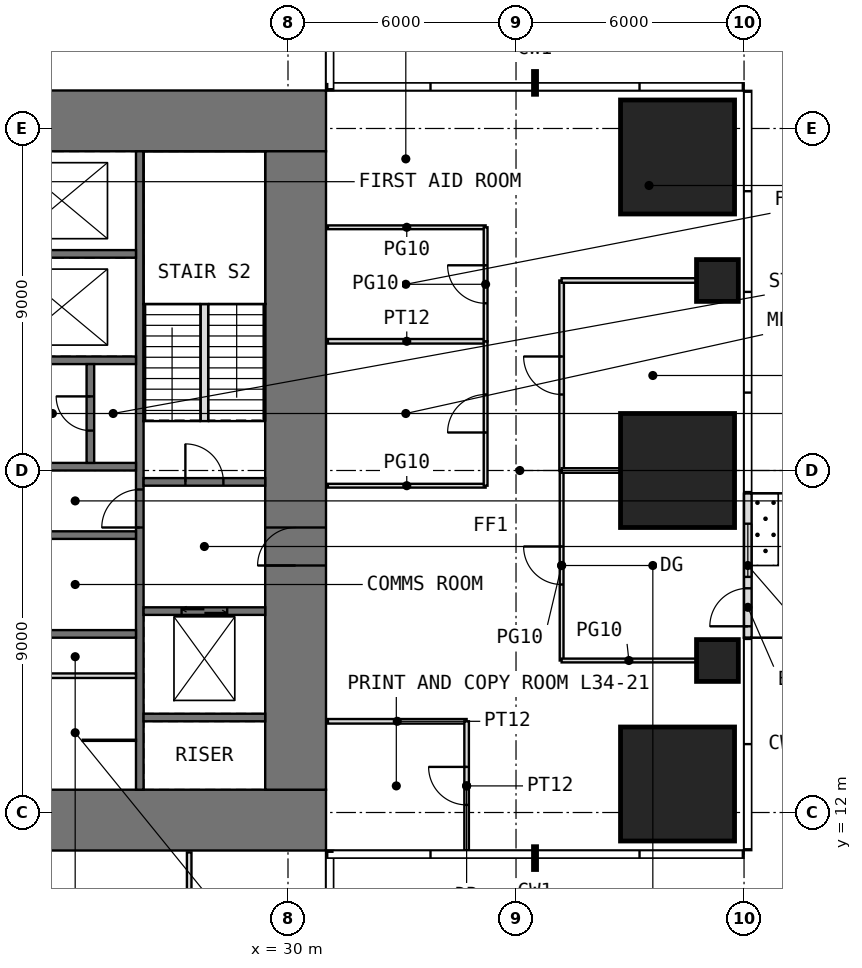
"""IFC4 building model, lengths in metres.
Left out: names, types, materials, properties, quantities, classifications, styles, units other than length and angle.
Written with IfcOpenShell. Run it as: python <this file> out.ifc"""

import sys

from ifc_helpers import new_model, si_unit, direction, frame, frame_2d, origin, origin_2d, place, context, subcontext, project, spatial, rectangle, extrude, element, fill, save


model = new_model("IFC4")
c1 = context("Model", 3, precision=1e-05, world=origin(), true_north=direction((0.0, 1.0)))
c2 = subcontext(c1, "Body", "Model", "MODEL_VIEW")
j1 = project(units=[si_unit("LENGTHUNIT", "METRE"), si_unit("PLANEANGLEUNIT", "RADIAN")], contexts=[c1])
p1 = place(None, origin())
s1 = spatial("IfcSite", under=j1, at=p1, CompositionType="ELEMENT")
p2 = place(p1, origin())
s2 = spatial("IfcBuilding", under=s1, at=p2, CompositionType="ELEMENT")
p3 = place(p2, frame((0.0, 0.0, 144.5)))
s3 = spatial("IfcBuildingStorey", under=s2, at=p3, CompositionType="ELEMENT", Elevation=144.5)
p4 = place(p3, frame((40.25, 12.75, 0.0), z_axis=(0.0, 0.0, 1.0), x_axis=(1.0, 0.0, 0.0)))
e1 = element("IfcColumn", 1, at=p4, inside=s3, PredefinedType="COLUMN", context=c2, shape_type="SweptSolid", body=[
    extrude(rectangle(XDim=3.0, YDim=3.0, at=origin_2d()), origin(), (0.0, 0.0, 1.0), 4.0),
])
p5 = place(p3, frame((41.3, 16.0, 0.0), z_axis=(0.0, 0.0, 1.0), x_axis=(1.0, 0.0, 0.0)))
e2 = element("IfcColumn", 2, at=p5, inside=s3, PredefinedType="COLUMN", context=c2, shape_type="SweptSolid", body=[
    extrude(rectangle(XDim=1.1, YDim=1.1, at=origin_2d()), origin(), (0.0, 0.0, 1.0), 4.0),
])
p6 = place(p3, frame((40.25, 21.0, 0.0), z_axis=(0.0, 0.0, 1.0), x_axis=(1.0, 0.0, 0.0)))
e3 = element("IfcColumn", 3, at=p6, inside=s3, PredefinedType="COLUMN", context=c2, shape_type="SweptSolid", body=[
    extrude(rectangle(XDim=3.0, YDim=3.0, at=origin_2d()), origin(), (0.0, 0.0, 1.0), 4.0),
])
p7 = place(p3, frame((41.3, 26.0, 0.0), z_axis=(0.0, 0.0, 1.0), x_axis=(1.0, 0.0, 0.0)))
e4 = element("IfcColumn", 4, at=p7, inside=s3, PredefinedType="COLUMN", context=c2, shape_type="SweptSolid", body=[
    extrude(rectangle(XDim=1.1, YDim=1.1, at=origin_2d()), origin(), (0.0, 0.0, 1.0), 4.0),
])
p8 = place(p3, frame((40.25, 29.25, 0.0), z_axis=(0.0, 0.0, 1.0), x_axis=(1.0, 0.0, 0.0)))
e5 = element("IfcColumn", 5, at=p8, inside=s3, PredefinedType="COLUMN", context=c2, shape_type="SweptSolid", body=[
    extrude(rectangle(XDim=3.0, YDim=3.0, at=origin_2d()), origin(), (0.0, 0.0, 1.0), 4.0),
])
p9 = place(p3, frame((42.1, 16.6, 0.0), z_axis=(0.0, 0.0, 1.0), x_axis=(0.0, 1.0, 0.0)))
e6 = element("IfcWall", 6, at=p9, inside=s3, PredefinedType="USERDEFINED", context=c2, shape_type="SweptSolid", body=[
    extrude(rectangle(XDim=3.8, YDim=0.2, at=frame_2d((1.9, 0.0))), origin(), (0.0, 0.0, 1.0), 3.75),
])
p10 = place(p9, frame((0.3, 0.0, 0.0)))
e7 = element("IfcOpeningElement", 7, at=p10, cuts=e6, PredefinedType="OPENING", context=c2, shape_type="SweptSolid", body=[
    extrude(rectangle(XDim=1.0, YDim=2.4, at=frame_2d((0.5, 1.2))), frame((0.0, 0.11, 0.0), z_axis=(0.0, -1.0, 0.0), x_axis=(1.0, 0.0, 0.0)), (0.0, 0.0, 1.0), 0.22),
])
p11 = place(p9, frame((1.6, 0.0, 0.3)))
e8 = element("IfcOpeningElement", 8, at=p11, cuts=e6, PredefinedType="OPENING", context=c2, shape_type="SweptSolid", body=[
    extrude(rectangle(XDim=1.4, YDim=2.7, at=frame_2d((0.7, 1.35))), frame((0.0, 0.11, 0.0), z_axis=(0.0, -1.0, 0.0), x_axis=(1.0, 0.0, 0.0)), (0.0, 0.0, 1.0), 0.22),
])
p12 = place(p3, frame((11.0, 11.8, -0.05), z_axis=(0.0, 0.0, 1.0), x_axis=(1.0, 0.0, 0.0)))
e9 = element("IfcWall", 9, at=p12, inside=s3, PredefinedType="SHEAR", context=c2, shape_type="SweptSolid", body=[
    extrude(rectangle(XDim=20.0, YDim=1.6, at=frame_2d((10.0, 0.0))), origin(), (0.0, 0.0, 1.0), 4.0),
])
p13 = place(p12, frame((9.0, 0.0, 0.05)))
e10 = element("IfcOpeningElement", 10, at=p13, cuts=e9, PredefinedType="OPENING", context=c2, shape_type="SweptSolid", body=[
    extrude(rectangle(XDim=2.0, YDim=2.2, at=frame_2d((1.0, 1.1))), frame((0.0, 0.81, 0.0), z_axis=(0.0, -1.0, 0.0), x_axis=(1.0, 0.0, 0.0)), (0.0, 0.0, 1.0), 1.62),
])
p14 = place(p3, frame((11.0, 30.2, -0.05), z_axis=(0.0, 0.0, 1.0), x_axis=(1.0, 0.0, 0.0)))
e11 = element("IfcWall", 11, at=p14, inside=s3, PredefinedType="SHEAR", context=c2, shape_type="SweptSolid", body=[
    extrude(rectangle(XDim=20.0, YDim=1.6, at=frame_2d((10.0, 0.0))), origin(), (0.0, 0.0, 1.0), 4.0),
])
p15 = place(p14, frame((9.0, 0.0, 0.05)))
e12 = element("IfcOpeningElement", 12, at=p15, cuts=e11, PredefinedType="OPENING", context=c2, shape_type="SweptSolid", body=[
    extrude(rectangle(XDim=2.0, YDim=2.2, at=frame_2d((1.0, 1.1))), frame((0.0, 0.81, 0.0), z_axis=(0.0, -1.0, 0.0), x_axis=(1.0, 0.0, 0.0)), (0.0, 0.0, 1.0), 1.62),
])
p16 = place(p3, frame((30.2, 12.6, -0.05), z_axis=(0.0, 0.0, 1.0), x_axis=(0.0, 1.0, 0.0)))
e13 = element("IfcWall", 13, at=p16, inside=s3, PredefinedType="SHEAR", context=c2, shape_type="SweptSolid", body=[
    extrude(rectangle(XDim=16.8, YDim=1.6, at=frame_2d((8.4, 0.0))), origin(), (0.0, 0.0, 1.0), 4.0),
])
p17 = place(p16, frame((5.9, 0.0, 0.05)))
e14 = element("IfcOpeningElement", 14, at=p17, cuts=e13, PredefinedType="OPENING", context=c2, shape_type="SweptSolid", body=[
    extrude(rectangle(XDim=1.0, YDim=2.2, at=frame_2d((0.5, 1.1))), frame((0.0, 0.81, 0.0), z_axis=(0.0, -1.0, 0.0), x_axis=(1.0, 0.0, 0.0)), (0.0, 0.0, 1.0), 1.62),
])
p18 = place(p3, frame((26.1, 12.6, -0.05), z_axis=(0.0, 0.0, 1.0), x_axis=(0.0, 1.0, 0.0)))
e15 = element("IfcWall", 15, at=p18, inside=s3, PredefinedType="SHEAR", context=c2, shape_type="SweptSolid", body=[
    extrude(rectangle(XDim=16.8, YDim=0.2, at=frame_2d((8.4, 0.0))), origin(), (0.0, 0.0, 1.0), 4.0),
])
p19 = place(p18, frame((6.9, 0.0, 0.05)))
e16 = element("IfcOpeningElement", 16, at=p19, cuts=e15, PredefinedType="OPENING", context=c2, shape_type="SweptSolid", body=[
    extrude(rectangle(XDim=1.0, YDim=2.2, at=frame_2d((0.5, 1.1))), frame((0.0, 0.11, 0.0), z_axis=(0.0, -1.0, 0.0), x_axis=(1.0, 0.0, 0.0)), (0.0, 0.0, 1.0), 0.22),
])
for number, where, z_axis, x_axis in (
    (17, (22.8, 16.7, -0.05), (0.0, 0.0, 1.0), (1.0, 0.0, 0.0)),
    (18, (22.8, 19.3, -0.05), (0.0, 0.0, 1.0), (1.0, 0.0, 0.0)),
    (19, (22.8, 21.1, -0.05), (0.0, 0.0, 1.0), (1.0, 0.0, 0.0)),
    (20, (22.8, 23.9, -0.05), (0.0, 0.0, 1.0), (1.0, 0.0, 0.0)),
    (21, (22.8, 26.7, -0.05), (0.0, 0.0, 1.0), (1.0, 0.0, 0.0)),
    (22, (26.2, 14.5, -0.05), (0.0, 0.0, 1.0), (1.0, 0.0, 0.0)),
):
    element("IfcWall", number, at=place(p3, frame(where, z_axis=z_axis, x_axis=x_axis)), inside=s3, PredefinedType="SHEAR", context=c2, shape_type="SweptSolid", body=[
        extrude(rectangle(XDim=3.2, YDim=0.2, at=frame_2d((1.6, 0.0))), origin(), (0.0, 0.0, 1.0), 4.0),
    ])
p20 = place(p3, frame((26.2, 17.3, -0.05), z_axis=(0.0, 0.0, 1.0), x_axis=(1.0, 0.0, 0.0)))
e23 = element("IfcWall", 23, at=p20, inside=s3, PredefinedType="SHEAR", context=c2, shape_type="SweptSolid", body=[
    extrude(rectangle(XDim=3.2, YDim=0.2, at=frame_2d((1.6, 0.0))), origin(), (0.0, 0.0, 1.0), 4.0),
])
p21 = place(p20, frame((1.0, 0.0, 0.05)))
e24 = element("IfcOpeningElement", 24, at=p21, cuts=e23, PredefinedType="OPENING", context=c2, shape_type="SweptSolid", body=[
    extrude(rectangle(XDim=1.2, YDim=2.2, at=frame_2d((0.6, 1.1))), frame((0.0, 0.11, 0.0), z_axis=(0.0, -1.0, 0.0), x_axis=(1.0, 0.0, 0.0)), (0.0, 0.0, 1.0), 0.22),
])
p22 = place(p3, frame((26.2, 20.7, -0.05), z_axis=(0.0, 0.0, 1.0), x_axis=(1.0, 0.0, 0.0)))
e25 = element("IfcWall", 25, at=p22, inside=s3, PredefinedType="SHEAR", context=c2, shape_type="SweptSolid", body=[
    extrude(rectangle(XDim=3.2, YDim=0.2, at=frame_2d((1.6, 0.0))), origin(), (0.0, 0.0, 1.0), 4.0),
])
p23 = place(p22, frame((1.1, 0.0, 0.05)))
e26 = element("IfcOpeningElement", 26, at=p23, cuts=e25, PredefinedType="OPENING", context=c2, shape_type="SweptSolid", body=[
    extrude(rectangle(XDim=1.0, YDim=2.2, at=frame_2d((0.5, 1.1))), frame((0.0, 0.11, 0.0), z_axis=(0.0, -1.0, 0.0), x_axis=(1.0, 0.0, 0.0)), (0.0, 0.0, 1.0), 0.22),
])
p24 = place(p3, frame((22.8, 15.6, 0.0), z_axis=(0.0, 0.0, 1.0), x_axis=(1.0, 0.0, 0.0)))
e27 = element("IfcWall", 27, at=p24, inside=s3, PredefinedType="PARTITIONING", context=c2, shape_type="SweptSolid", body=[
    extrude(rectangle(XDim=3.2, YDim=0.12, at=frame_2d((1.6, 0.0))), origin(), (0.0, 0.0, 1.0), 3.75),
])
p25 = place(p3, frame((24.6, 13.9, 0.0), z_axis=(0.0, 0.0, 1.0), x_axis=(1.0, 0.0, 0.0)))
e28 = element("IfcWall", 28, at=p25, inside=s3, PredefinedType="PARTITIONING", context=c2, shape_type="SweptSolid", body=[
    extrude(rectangle(XDim=1.4, YDim=0.03, at=frame_2d((0.7, 0.0))), origin(), (0.0, 0.0, 1.0), 3.75),
])
p26 = place(p3, frame((24.8, 21.2, -0.05), z_axis=(0.0, 0.0, 1.0), x_axis=(0.0, 1.0, 0.0)))
e29 = element("IfcWall", 29, at=p26, inside=s3, PredefinedType="SHEAR", context=c2, shape_type="SweptSolid", body=[
    extrude(rectangle(XDim=2.6, YDim=0.2, at=frame_2d((1.3, 0.0))), origin(), (0.0, 0.0, 1.0), 4.0),
])
p27 = place(p26, frame((0.85, 0.0, 0.05)))
e30 = element("IfcOpeningElement", 30, at=p27, cuts=e29, PredefinedType="OPENING", context=c2, shape_type="SweptSolid", body=[
    extrude(rectangle(XDim=0.9, YDim=2.2, at=frame_2d((0.45, 1.1))), frame((0.0, 0.11, 0.0), z_axis=(0.0, -1.0, 0.0), x_axis=(1.0, 0.0, 0.0)), (0.0, 0.0, 1.0), 0.22),
])
p28 = place(p3, frame((27.4, 6.8, 0.0), z_axis=(0.0, 0.0, 1.0), x_axis=(0.0, 1.0, 0.0)))
e31 = element("IfcWall", 31, at=p28, inside=s3, PredefinedType="PARTITIONING", context=c2, shape_type="SweptSolid", body=[
    extrude(rectangle(XDim=4.15, YDim=0.12, at=frame_2d((2.075, 0.0))), origin(), (0.0, 0.0, 1.0), 3.75),
])
p29 = place(p3, frame((31.05, 14.4, 0.0), z_axis=(0.0, 0.0, 1.0), x_axis=(1.0, 0.0, 0.0)))
e32 = element("IfcWall", 32, at=p29, inside=s3, PredefinedType="PARTITIONING", context=c2, shape_type="SweptSolid", body=[
    extrude(rectangle(XDim=3.65, YDim=0.12, at=frame_2d((1.825, 0.0))), origin(), (0.0, 0.0, 1.0), 3.75),
])
p30 = place(p3, frame((31.05, 20.6, 0.0), z_axis=(0.0, 0.0, 1.0), x_axis=(1.0, 0.0, 0.0)))
e33 = element("IfcWall", 33, at=p30, inside=s3, PredefinedType="PARTITIONING", context=c2, shape_type="SweptSolid", body=[
    extrude(rectangle(XDim=4.15, YDim=0.1, at=frame_2d((2.075, 0.0))), origin(), (0.0, 0.0, 1.0), 3.75),
])
p31 = place(p3, frame((31.05, 24.4, 0.0), z_axis=(0.0, 0.0, 1.0), x_axis=(1.0, 0.0, 0.0)))
e34 = element("IfcWall", 34, at=p31, inside=s3, PredefinedType="PARTITIONING", context=c2, shape_type="SweptSolid", body=[
    extrude(rectangle(XDim=4.15, YDim=0.12, at=frame_2d((2.075, 0.0))), origin(), (0.0, 0.0, 1.0), 3.75),
])
p32 = place(p3, frame((31.05, 27.4, 0.0), z_axis=(0.0, 0.0, 1.0), x_axis=(1.0, 0.0, 0.0)))
e35 = element("IfcWall", 35, at=p32, inside=s3, PredefinedType="PARTITIONING", context=c2, shape_type="SweptSolid", body=[
    extrude(rectangle(XDim=4.15, YDim=0.1, at=frame_2d((2.075, 0.0))), origin(), (0.0, 0.0, 1.0), 3.75),
])
p33 = place(p3, frame((34.7, 11.0, 0.0), z_axis=(0.0, 0.0, 1.0), x_axis=(0.0, 1.0, 0.0)))
e36 = element("IfcWall", 36, at=p33, inside=s3, PredefinedType="PARTITIONING", context=c2, shape_type="SweptSolid", body=[
    extrude(rectangle(XDim=3.4, YDim=0.12, at=frame_2d((1.7, 0.0))), origin(), (0.0, 0.0, 1.0), 3.75),
])
p34 = place(p33, frame((1.2, 0.0, 0.0)))
e37 = element("IfcOpeningElement", 37, at=p34, cuts=e36, PredefinedType="OPENING", context=c2, shape_type="SweptSolid", body=[
    extrude(rectangle(XDim=1.0, YDim=2.2, at=frame_2d((0.5, 1.1))), frame((0.0, 0.07, 0.0), z_axis=(0.0, -1.0, 0.0), x_axis=(1.0, 0.0, 0.0)), (0.0, 0.0, 1.0), 0.14),
])
p35 = place(p3, frame((35.2, 20.6, 0.0), z_axis=(0.0, 0.0, 1.0), x_axis=(0.0, 1.0, 0.0)))
e38 = element("IfcWall", 38, at=p35, inside=s3, PredefinedType="PARTITIONING", context=c2, shape_type="SweptSolid", body=[
    extrude(rectangle(XDim=3.8, YDim=0.1, at=frame_2d((1.9, 0.0))), origin(), (0.0, 0.0, 1.0), 3.75),
])
p36 = place(p35, frame((1.4, 0.0, 0.0)))
e39 = element("IfcOpeningElement", 39, at=p36, cuts=e38, PredefinedType="OPENING", context=c2, shape_type="SweptSolid", body=[
    extrude(rectangle(XDim=1.0, YDim=2.4, at=frame_2d((0.5, 1.2))), frame((0.0, 0.06, 0.0), z_axis=(0.0, -1.0, 0.0), x_axis=(1.0, 0.0, 0.0)), (0.0, 0.0, 1.0), 0.12),
])
p37 = place(p3, frame((35.2, 24.4, 0.0), z_axis=(0.0, 0.0, 1.0), x_axis=(0.0, 1.0, 0.0)))
e40 = element("IfcWall", 40, at=p37, inside=s3, PredefinedType="PARTITIONING", context=c2, shape_type="SweptSolid", body=[
    extrude(rectangle(XDim=3.0, YDim=0.1, at=frame_2d((1.5, 0.0))), origin(), (0.0, 0.0, 1.0), 3.75),
])
p38 = place(p37, frame((1.0, 0.0, 0.0)))
e41 = element("IfcOpeningElement", 41, at=p38, cuts=e40, PredefinedType="OPENING", context=c2, shape_type="SweptSolid", body=[
    extrude(rectangle(XDim=1.0, YDim=2.4, at=frame_2d((0.5, 1.2))), frame((0.0, 0.06, 0.0), z_axis=(0.0, -1.0, 0.0), x_axis=(1.0, 0.0, 0.0)), (0.0, 0.0, 1.0), 0.12),
])
p39 = place(p3, frame((37.2, 16.0, 0.0), z_axis=(0.0, 0.0, 1.0), x_axis=(0.0, 1.0, 0.0)))
e42 = element("IfcWall", 42, at=p39, inside=s3, PredefinedType="PARTITIONING", context=c2, shape_type="SweptSolid", body=[
    extrude(rectangle(XDim=5.0, YDim=0.1, at=frame_2d((2.5, 0.0))), origin(), (0.0, 0.0, 1.0), 3.75),
])
p40 = place(p39, frame((2.0, 0.0, 0.0)))
e43 = element("IfcOpeningElement", 43, at=p40, cuts=e42, PredefinedType="OPENING", context=c2, shape_type="SweptSolid", body=[
    extrude(rectangle(XDim=1.0, YDim=2.4, at=frame_2d((0.5, 1.2))), frame((0.0, 0.06, 0.0), z_axis=(0.0, -1.0, 0.0), x_axis=(1.0, 0.0, 0.0)), (0.0, 0.0, 1.0), 0.12),
])
p41 = place(p3, frame((37.2, 16.0, 0.0), z_axis=(0.0, 0.0, 1.0), x_axis=(1.0, 0.0, 0.0)))
e44 = element("IfcWall", 44, at=p41, inside=s3, PredefinedType="PARTITIONING", context=c2, shape_type="SweptSolid", body=[
    extrude(rectangle(XDim=3.54, YDim=0.1, at=frame_2d((1.77, 0.0))), origin(), (0.0, 0.0, 1.0), 3.75),
])
p42 = place(p3, frame((37.2, 21.0, 0.0), z_axis=(0.0, 0.0, 1.0), x_axis=(0.0, 1.0, 0.0)))
e45 = element("IfcWall", 45, at=p42, inside=s3, PredefinedType="PARTITIONING", context=c2, shape_type="SweptSolid", body=[
    extrude(rectangle(XDim=5.0, YDim=0.12, at=frame_2d((2.5, 0.0))), origin(), (0.0, 0.0, 1.0), 3.75),
])
p43 = place(p42, frame((2.0, 0.0, 0.0)))
e46 = element("IfcOpeningElement", 46, at=p43, cuts=e45, PredefinedType="OPENING", context=c2, shape_type="SweptSolid", body=[
    extrude(rectangle(XDim=1.0, YDim=2.2, at=frame_2d((0.5, 1.1))), frame((0.0, 0.07, 0.0), z_axis=(0.0, -1.0, 0.0), x_axis=(1.0, 0.0, 0.0)), (0.0, 0.0, 1.0), 0.14),
])
p44 = place(p3, frame((37.2, 21.0, 0.0), z_axis=(0.0, 0.0, 1.0), x_axis=(1.0, 0.0, 0.0)))
e47 = element("IfcWall", 47, at=p44, inside=s3, PredefinedType="PARTITIONING", context=c2, shape_type="SweptSolid", body=[
    extrude(rectangle(XDim=1.54, YDim=0.12, at=frame_2d((0.77, 0.0))), origin(), (0.0, 0.0, 1.0), 3.75),
])
p45 = place(p3, frame((37.2, 26.0, 0.0), z_axis=(0.0, 0.0, 1.0), x_axis=(1.0, 0.0, 0.0)))
e48 = element("IfcWall", 48, at=p45, inside=s3, PredefinedType="PARTITIONING", context=c2, shape_type="SweptSolid", body=[
    extrude(rectangle(XDim=3.54, YDim=0.12, at=frame_2d((1.77, 0.0))), origin(), (0.0, 0.0, 1.0), 3.75),
])
p46 = place(p3, frame((27.8, 22.3, 0.0), z_axis=(0.0, 0.0, 1.0), x_axis=(0.0, 1.0, 0.0)))
e49 = element("IfcWall", 49, at=p46, inside=s3, PredefinedType="PARTITIONING", context=c2, shape_type="SweptSolid", body=[
    extrude(rectangle(XDim=3.08, YDim=0.2, at=frame_2d((1.54, 0.0))), origin(), (0.0, 0.0, 1.0), 4.0),
])
p47 = place(p10, origin())
e50 = element("IfcDoor", 50, at=p47, inside=s3, OperationType="SINGLE_SWING_LEFT", PredefinedType="DOOR", context=c2, shape_type="SweptSolid", body=[
    extrude(rectangle(XDim=1.0, YDim=2.4, at=frame_2d((0.5, 1.2))), frame((0.0, 0.025, 0.0), z_axis=(0.0, -1.0, 0.0), x_axis=(1.0, 0.0, 0.0)), (0.0, 0.0, 1.0), 0.05),
])
fill(e7, e50)
p48 = place(p11, origin())
e51 = element("IfcWindow", 51, at=p48, inside=s3, PartitioningType="SINGLE_PANEL", PredefinedType="WINDOW", context=c2, shape_type="SweptSolid", body=[
    extrude(rectangle(XDim=1.4, YDim=2.7, at=frame_2d((0.7, 1.35))), frame((0.0, 0.03, 0.0), z_axis=(0.0, -1.0, 0.0), x_axis=(1.0, 0.0, 0.0)), (0.0, 0.0, 1.0), 0.06),
])
fill(e8, e51)
p49 = place(p17, origin())
e52 = element("IfcDoor", 52, at=p49, inside=s3, OperationType="SINGLE_SWING_LEFT", PredefinedType="DOOR", context=c2, shape_type="SweptSolid", body=[
    extrude(rectangle(XDim=1.0, YDim=2.2, at=frame_2d((0.5, 1.1))), frame((0.0, 0.025, 0.0), z_axis=(0.0, -1.0, 0.0), x_axis=(1.0, 0.0, 0.0)), (0.0, 0.0, 1.0), 0.05),
])
fill(e14, e52)
p50 = place(p23, origin())
e53 = element("IfcDoor", 53, at=p50, inside=s3, OperationType="SINGLE_SWING_LEFT", PredefinedType="DOOR", context=c2, shape_type="SweptSolid", body=[
    extrude(rectangle(XDim=1.0, YDim=2.2, at=frame_2d((0.5, 1.1))), frame((0.0, 0.025, 0.0), z_axis=(0.0, -1.0, 0.0), x_axis=(1.0, 0.0, 0.0)), (0.0, 0.0, 1.0), 0.05),
])
fill(e26, e53)
p51 = place(p19, origin())
e54 = element("IfcDoor", 54, at=p51, inside=s3, OperationType="SINGLE_SWING_LEFT", PredefinedType="DOOR", context=c2, shape_type="SweptSolid", body=[
    extrude(rectangle(XDim=1.0, YDim=2.2, at=frame_2d((0.5, 1.1))), frame((0.0, 0.025, 0.0), z_axis=(0.0, -1.0, 0.0), x_axis=(1.0, 0.0, 0.0)), (0.0, 0.0, 1.0), 0.05),
])
fill(e16, e54)
p52 = place(p27, origin())
e55 = element("IfcDoor", 55, at=p52, inside=s3, OperationType="SINGLE_SWING_RIGHT", PredefinedType="DOOR", context=c2, shape_type="SweptSolid", body=[
    extrude(rectangle(XDim=0.9, YDim=2.2, at=frame_2d((0.45, 1.1))), frame((0.0, 0.025, 0.0), z_axis=(0.0, -1.0, 0.0), x_axis=(1.0, 0.0, 0.0)), (0.0, 0.0, 1.0), 0.05),
])
fill(e30, e55)
p53 = place(p34, origin())
e56 = element("IfcDoor", 56, at=p53, inside=s3, OperationType="SINGLE_SWING_RIGHT", PredefinedType="DOOR", context=c2, shape_type="SweptSolid", body=[
    extrude(rectangle(XDim=1.0, YDim=2.2, at=frame_2d((0.5, 1.1))), frame((0.0, 0.025, 0.0), z_axis=(0.0, -1.0, 0.0), x_axis=(1.0, 0.0, 0.0)), (0.0, 0.0, 1.0), 0.05),
])
fill(e37, e56)
p54 = place(p36, origin())
e57 = element("IfcDoor", 57, at=p54, inside=s3, OperationType="SINGLE_SWING_LEFT", PredefinedType="DOOR", context=c2, shape_type="SweptSolid", body=[
    extrude(rectangle(XDim=1.0, YDim=2.4, at=frame_2d((0.5, 1.2))), frame((0.0, 0.025, 0.0), z_axis=(0.0, -1.0, 0.0), x_axis=(1.0, 0.0, 0.0)), (0.0, 0.0, 1.0), 0.05),
])
fill(e39, e57)
p55 = place(p38, origin())
e58 = element("IfcDoor", 58, at=p55, inside=s3, OperationType="SINGLE_SWING_RIGHT", PredefinedType="DOOR", context=c2, shape_type="SweptSolid", body=[
    extrude(rectangle(XDim=1.0, YDim=2.4, at=frame_2d((0.5, 1.2))), frame((0.0, 0.025, 0.0), z_axis=(0.0, -1.0, 0.0), x_axis=(1.0, 0.0, 0.0)), (0.0, 0.0, 1.0), 0.05),
])
fill(e41, e58)
p56 = place(p40, origin())
e59 = element("IfcDoor", 59, at=p56, inside=s3, OperationType="SINGLE_SWING_RIGHT", PredefinedType="DOOR", context=c2, shape_type="SweptSolid", body=[
    extrude(rectangle(XDim=1.0, YDim=2.4, at=frame_2d((0.5, 1.2))), frame((0.0, 0.025, 0.0), z_axis=(0.0, -1.0, 0.0), x_axis=(1.0, 0.0, 0.0)), (0.0, 0.0, 1.0), 0.05),
])
fill(e43, e59)
p57 = place(p43, origin())
e60 = element("IfcDoor", 60, at=p57, inside=s3, OperationType="SINGLE_SWING_RIGHT", PredefinedType="DOOR", context=c2, shape_type="SweptSolid", body=[
    extrude(rectangle(XDim=1.0, YDim=2.2, at=frame_2d((0.5, 1.1))), frame((0.0, 0.025, 0.0), z_axis=(0.0, -1.0, 0.0), x_axis=(1.0, 0.0, 0.0)), (0.0, 0.0, 1.0), 0.05),
])
fill(e46, e60)
p58 = place(p21, origin())
e61 = element("IfcDoor", 61, at=p58, inside=s3, OperationType="DOUBLE_DOOR_SLIDING", PredefinedType="DOOR", context=c2, shape_type="SweptSolid", body=[
    extrude(rectangle(XDim=1.2, YDim=2.2, at=frame_2d((0.6, 1.1))), frame((0.0, 0.025, 0.0), z_axis=(0.0, -1.0, 0.0), x_axis=(1.0, 0.0, 0.0)), (0.0, 0.0, 1.0), 0.05),
])
fill(e24, e61)
save(model, sys.argv[1])
